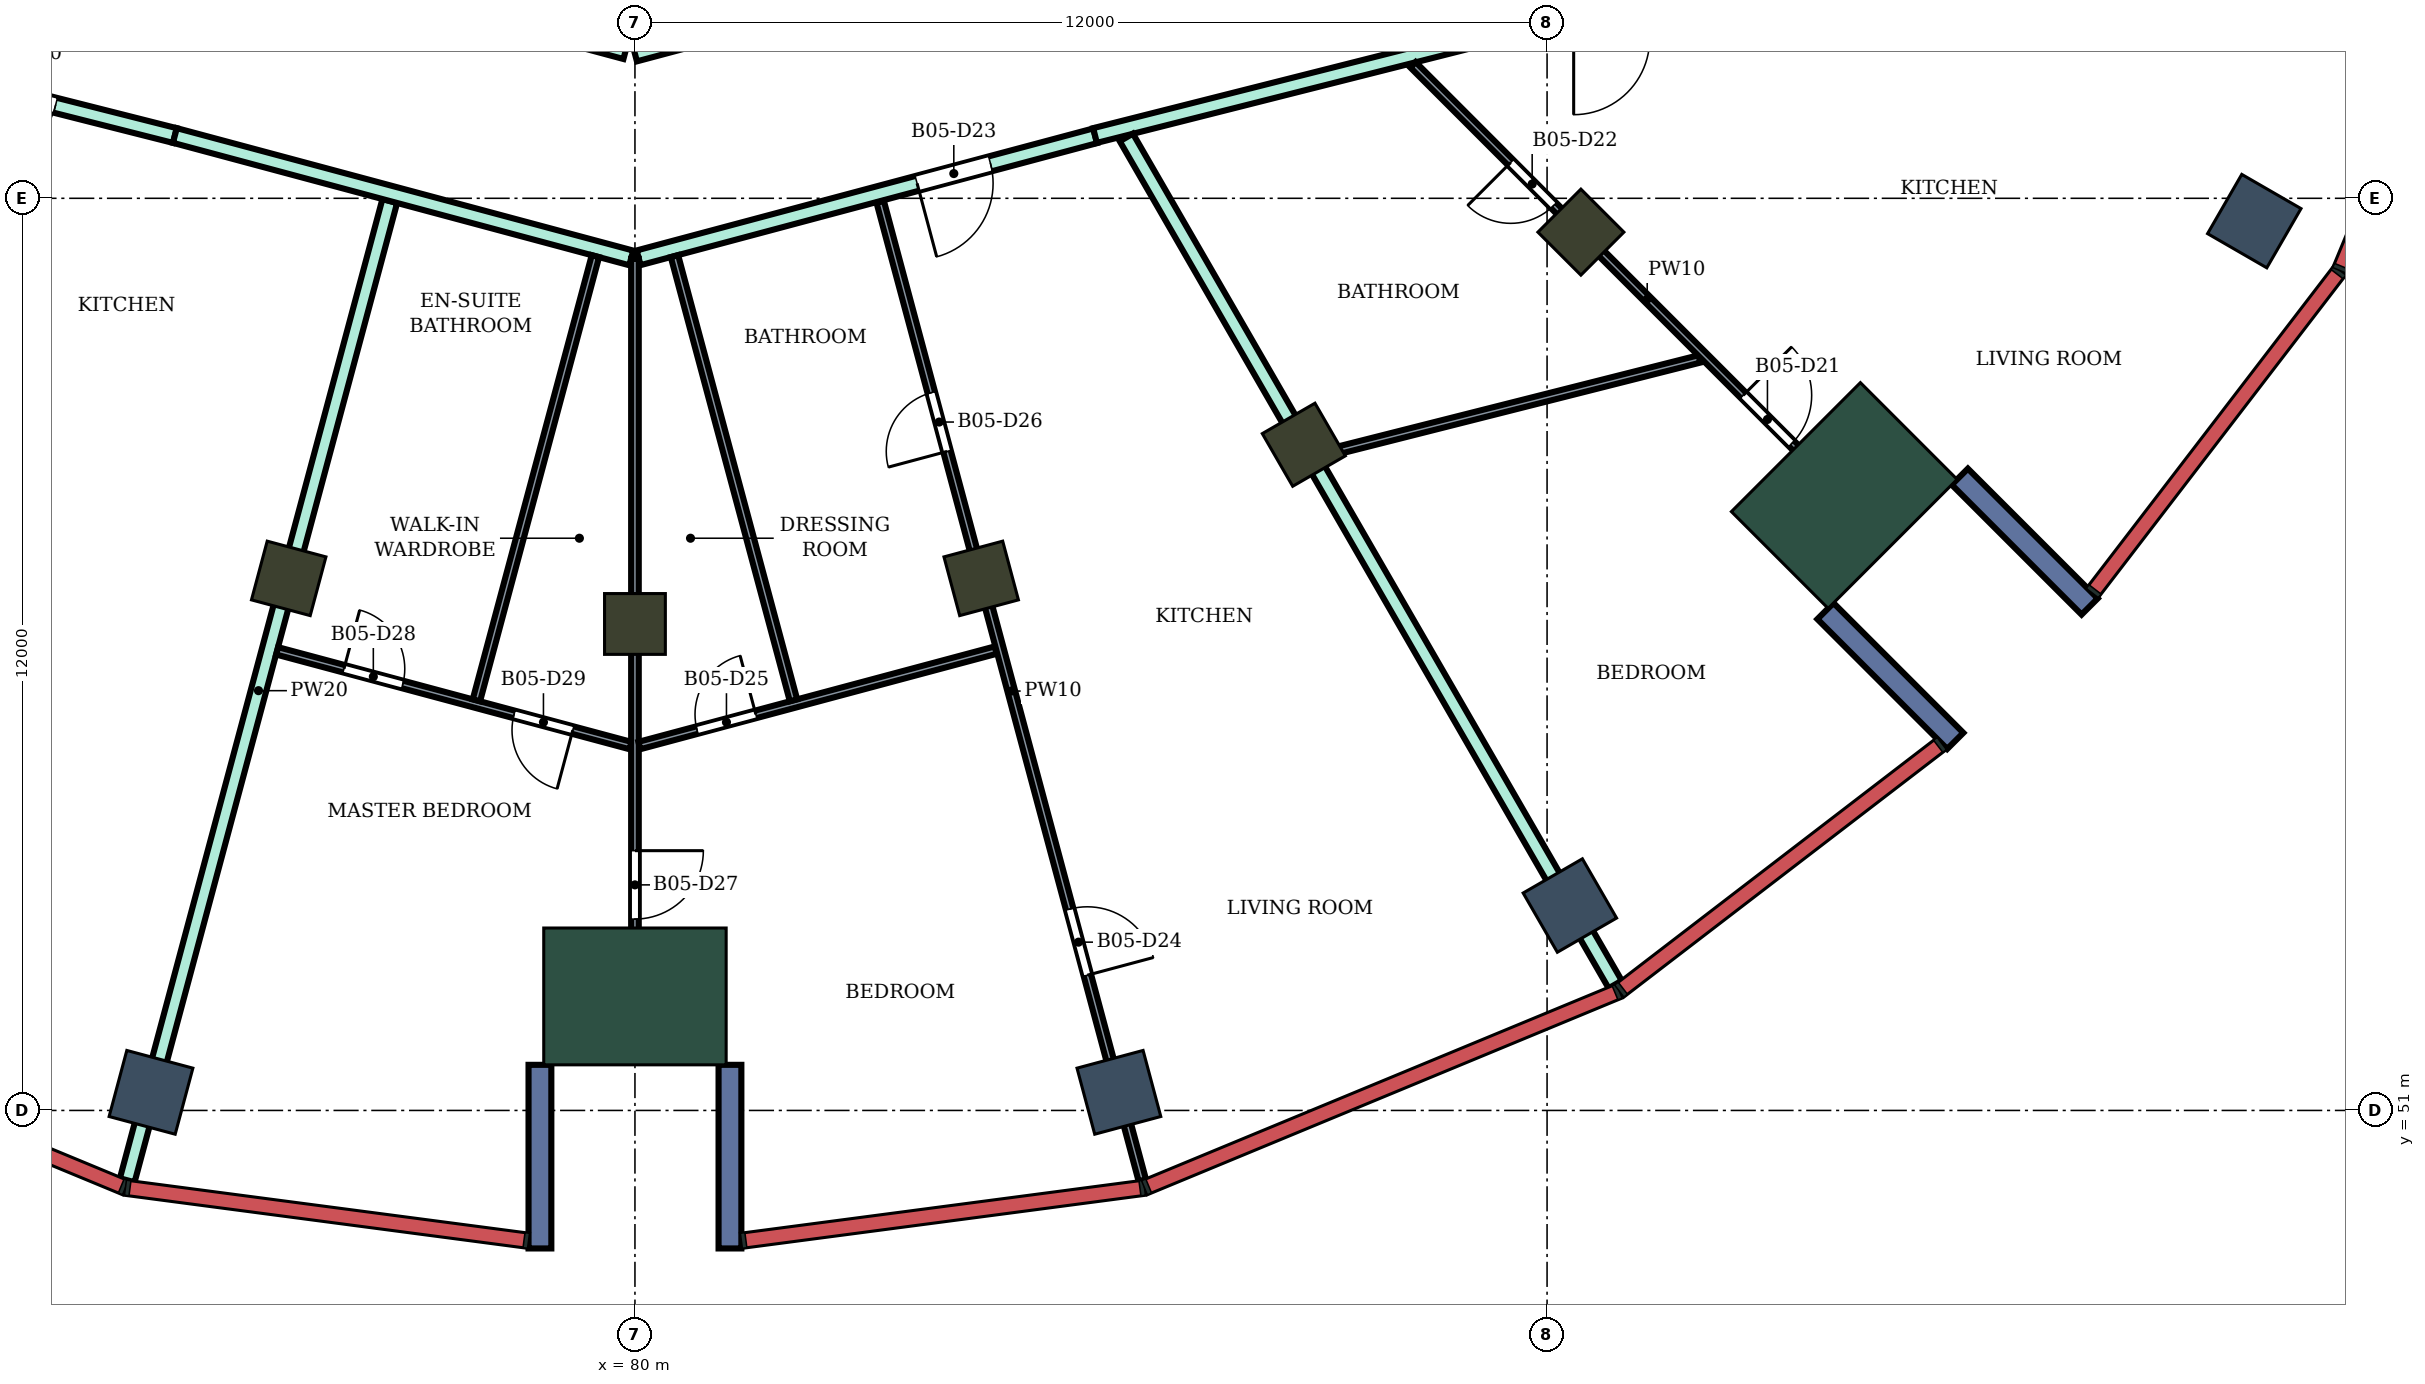
"""IFC4 building model, lengths in metres.
Left out: names, types, materials, properties, quantities, classifications, styles, units other than length and angle.
Written with IfcOpenShell. Run it as: python <this file> out.ifc"""

import sys

from ifc_helpers import new_model, si_unit, direction, frame, frame_2d, origin, origin_2d, place, context, subcontext, project, spatial, rectangle, extrude, element, fill, save


model = new_model("IFC4")
c1 = context("Model", 3, precision=1e-05, world=origin(), true_north=direction((0.0, 1.0)))
c2 = subcontext(c1, "Body", "Model", "MODEL_VIEW")
j1 = project(units=[si_unit("LENGTHUNIT", "METRE"), si_unit("PLANEANGLEUNIT", "RADIAN")], contexts=[c1])
p1 = place(None, origin())
s1 = spatial("IfcSite", under=j1, at=p1, CompositionType="ELEMENT")
p2 = place(p1, origin())
s2 = spatial("IfcBuilding", under=s1, at=p2, CompositionType="ELEMENT")
p3 = place(p2, frame((0.0, 0.0, 262.5)))
s3 = spatial("IfcBuildingStorey", under=s2, at=p3, CompositionType="ELEMENT", Elevation=262.5)
for number, where, z_axis, x_axis in (
    (1, (73.633, 51.238, 0.0), (0.0, 0.0, 1.0), (-0.259, -0.966, 0.0)),
    (2, (86.367, 51.238, 0.0), (0.0, 0.0, 1.0), (0.259, -0.966, 0.0)),
    (3, (92.3, 53.696, 0.0), (0.0, 0.0, 1.0), (0.5, -0.866, 0.0)),
    (4, (101.304, 62.7, 0.0), (0.0, 0.0, 1.0), (0.866, -0.5, 0.0)),
):
    element("IfcColumn", number, at=place(p3, frame(where, z_axis=z_axis, x_axis=x_axis)), inside=s3, PredefinedType="COLUMN", context=c2, shape_type="SweptSolid", body=[
        extrude(rectangle(XDim=0.9, YDim=0.9, at=origin_2d()), origin(), (0.0, 0.0, 1.0), 4.2),
    ])
for number, where, z_axis, x_axis in (
    (5, (75.445, 58.0, 0.0), (0.0, 0.0, 1.0), (-0.259, -0.966, 0.0)),
    (6, (80.0, 57.4, 0.0), (0.0, 0.0, 1.0), (0.0, -1.0, 0.0)),
    (7, (84.555, 58.0, 0.0), (0.0, 0.0, 1.0), (0.259, -0.966, 0.0)),
    (8, (88.8, 59.758, 0.0), (0.0, 0.0, 1.0), (0.5, -0.866, 0.0)),
    (9, (92.445, 62.555, 0.0), (0.0, 0.0, 1.0), (0.707, -0.707, 0.0)),
):
    element("IfcColumn", number, at=place(p3, frame(where, z_axis=z_axis, x_axis=x_axis)), inside=s3, PredefinedType="COLUMN", context=c2, shape_type="SweptSolid", body=[
        extrude(rectangle(XDim=0.8, YDim=0.8, at=origin_2d()), origin(), (0.0, 0.0, 1.0), 4.2),
    ])
for number, where, z_axis, x_axis in (
    (10, (80.0, 52.5, 0.0), (0.0, 0.0, 1.0), (0.0, -1.0, 0.0)),
    (11, (95.91, 59.09, 0.0), (0.0, 0.0, 1.0), (0.707, -0.707, 0.0)),
):
    element("IfcColumn", number, at=place(p3, frame(where, z_axis=z_axis, x_axis=x_axis)), inside=s3, PredefinedType="COLUMN", context=c2, shape_type="SweptSolid", body=[
        extrude(rectangle(XDim=1.8, YDim=2.4, at=origin_2d()), origin(), (0.0, 0.0, 1.0), 4.2),
    ])
for number, where, z_axis, x_axis in (
    (12, (78.75, 51.6, 0.0), (0.0, 0.0, 1.0), (0.0, -1.0, 0.0)),
    (13, (81.25, 51.6, 0.0), (0.0, 0.0, 1.0), (0.0, -1.0, 0.0)),
    (14, (95.662, 57.57, 0.0), (0.0, 0.0, 1.0), (0.707, -0.707, 0.0)),
    (15, (97.43, 59.338, 0.0), (0.0, 0.0, 1.0), (0.707, -0.707, 0.0)),
):
    element("IfcWall", number, at=place(p3, frame(where, z_axis=z_axis, x_axis=x_axis)), inside=s3, PredefinedType="NOTDEFINED", context=c2, shape_type="SweptSolid", body=[
        extrude(rectangle(XDim=2.416, YDim=0.3, at=frame_2d((1.208, 0.0))), origin(), (0.0, 0.0, 1.0), 4.2),
    ])
p4 = place(p3, frame((68.2, 65.28, 0.0), z_axis=(0.0, 0.0, 1.0), x_axis=(0.969428528216, -0.245373854926, 0.0)))
e16 = element("IfcWall", 16, at=p4, inside=s3, PredefinedType="PARTITIONING", context=c2, shape_type="SweptSolid", body=[
    extrude(rectangle(XDim=5.928, YDim=0.2, at=frame_2d((2.964, 0.0))), origin(), (0.0, 0.0, 1.0), 3.75),
])
p5 = place(p4, frame((3.309, 0.0, 0.0)))
e17 = element("IfcOpeningElement", 17, at=p5, cuts=e16, PredefinedType="OPENING", context=c2, shape_type="SweptSolid", body=[
    extrude(rectangle(XDim=1.0, YDim=2.1, at=frame_2d((0.5, 1.05))), frame((0.0, 0.11, 0.0), z_axis=(0.0, -1.0, 0.0), x_axis=(1.0, 0.0, 0.0)), (0.0, 0.0, 1.0), 0.22),
])
p6 = place(p3, frame((73.32, 50.082, 0.0), z_axis=(0.0, 0.0, 1.0), x_axis=(0.258966962665, 0.965886179758, 0.0)))
e18 = element("IfcWall", 18, at=p6, inside=s3, PredefinedType="PARTITIONING", context=c2, shape_type="SweptSolid", body=[
    extrude(rectangle(XDim=13.337, YDim=0.2, at=frame_2d((6.668, 0.0))), origin(), (0.0, 0.0, 1.0), 3.75),
])
p7 = place(p3, frame((73.947, 63.826, 0.0), z_axis=(0.0, 0.0, 1.0), x_axis=(0.965856500469, -0.259077634122, 0.0)))
e19 = element("IfcWall", 19, at=p7, inside=s3, PredefinedType="PARTITIONING", context=c2, shape_type="SweptSolid", body=[
    extrude(rectangle(XDim=6.217, YDim=0.2, at=frame_2d((3.108, 0.0))), origin(), (0.0, 0.0, 1.0), 3.75),
])
p8 = place(p3, frame((74.603, 66.342, 0.0), z_axis=(0.0, 0.0, 1.0), x_axis=(0.965920893652, -0.258837453254, 0.0)))
e20 = element("IfcWall", 20, at=p8, inside=s3, PredefinedType="PARTITIONING", context=c2, shape_type="SweptSolid", body=[
    extrude(rectangle(XDim=5.458, YDim=0.2, at=frame_2d((2.729, 0.0))), origin(), (0.0, 0.0, 1.0), 3.75),
])
p9 = place(p8, frame((2.512, 0.0, 0.0)))
e21 = element("IfcOpeningElement", 21, at=p9, cuts=e20, PredefinedType="OPENING", context=c2, shape_type="SweptSolid", body=[
    extrude(rectangle(XDim=0.9, YDim=2.1, at=frame_2d((0.45, 1.05))), frame((0.0, 0.11, 0.0), z_axis=(0.0, -1.0, 0.0), x_axis=(1.0, 0.0, 0.0)), (0.0, 0.0, 1.0), 0.22),
])
p10 = place(p3, frame((80.048, 62.217, 0.0), z_axis=(0.0, 0.0, 1.0), x_axis=(0.966097920642, 0.258175923996, 0.0)))
e22 = element("IfcWall", 22, at=p10, inside=s3, PredefinedType="PARTITIONING", context=c2, shape_type="SweptSolid", body=[
    extrude(rectangle(XDim=6.217, YDim=0.2, at=frame_2d((3.108, 0.0))), origin(), (0.0, 0.0, 1.0), 3.75),
])
p11 = place(p10, frame((3.792, 0.0, 0.0)))
e23 = element("IfcOpeningElement", 23, at=p11, cuts=e22, PredefinedType="OPENING", context=c2, shape_type="SweptSolid", body=[
    extrude(rectangle(XDim=1.0, YDim=2.1, at=frame_2d((0.5, 1.05))), frame((0.0, 0.11, 0.0), z_axis=(0.0, -1.0, 0.0), x_axis=(1.0, 0.0, 0.0)), (0.0, 0.0, 1.0), 0.22),
])
p12 = place(p3, frame((80.0, 64.898, 0.0), z_axis=(0.0, 0.0, 1.0), x_axis=(0.966236923997, 0.25765520896, 0.0)))
e24 = element("IfcWall", 24, at=p12, inside=s3, PredefinedType="PARTITIONING", context=c2, shape_type="SweptSolid", body=[
    extrude(rectangle(XDim=8.168, YDim=0.2, at=frame_2d((4.084, 0.0))), origin(), (0.0, 0.0, 1.0), 3.75),
])
p13 = place(p12, frame((1.893, 0.0, 0.0)))
e25 = element("IfcOpeningElement", 25, at=p13, cuts=e24, PredefinedType="OPENING", context=c2, shape_type="SweptSolid", body=[
    extrude(rectangle(XDim=1.8, YDim=2.1, at=frame_2d((0.9, 1.05))), frame((0.0, 0.11, 0.0), z_axis=(0.0, -1.0, 0.0), x_axis=(1.0, 0.0, 0.0)), (0.0, 0.0, 1.0), 0.22),
])
p14 = place(p3, frame((86.053, 63.826, 0.0), z_axis=(0.0, 0.0, 1.0), x_axis=(0.969490004987, 0.245130843083, 0.0)))
e26 = element("IfcWall", 26, at=p14, inside=s3, PredefinedType="PARTITIONING", context=c2, shape_type="SweptSolid", body=[
    extrude(rectangle(XDim=5.908, YDim=0.2, at=frame_2d((2.954, 0.0))), origin(), (0.0, 0.0, 1.0), 3.75),
])
p15 = place(p3, frame((86.465, 63.801, 0.0), z_axis=(0.0, 0.0, 1.0), x_axis=(0.499914633865, -0.866074684336, 0.0)))
e27 = element("IfcWall", 27, at=p15, inside=s3, PredefinedType="PARTITIONING", context=c2, shape_type="SweptSolid", body=[
    extrude(rectangle(XDim=12.866, YDim=0.2, at=frame_2d((6.433, 0.0))), origin(), (0.0, 0.0, 1.0), 3.75),
])
p16 = place(p3, frame((75.293, 57.046, 0.0), z_axis=(0.0, 0.0, 1.0), x_axis=(0.965904119246, -0.258900043306, 0.0)))
e28 = element("IfcWall", 28, at=p16, inside=s3, PredefinedType="PARTITIONING", context=c2, shape_type="SweptSolid", body=[
    extrude(rectangle(XDim=4.813, YDim=0.1, at=frame_2d((2.406, 0.0))), origin(), (0.0, 0.0, 1.0), 3.75),
])
p17 = place(p16, frame((0.91, 0.0, 0.0)))
e29 = element("IfcOpeningElement", 29, at=p17, cuts=e28, PredefinedType="OPENING", context=c2, shape_type="SweptSolid", body=[
    extrude(rectangle(XDim=0.8, YDim=2.1, at=frame_2d((0.4, 1.05))), frame((0.0, 0.06, 0.0), z_axis=(0.0, -1.0, 0.0), x_axis=(1.0, 0.0, 0.0)), (0.0, 0.0, 1.0), 0.12),
])
p18 = place(p16, frame((3.227, 0.0, 0.0)))
e30 = element("IfcOpeningElement", 30, at=p18, cuts=e28, PredefinedType="OPENING", context=c2, shape_type="SweptSolid", body=[
    extrude(rectangle(XDim=0.8, YDim=2.1, at=frame_2d((0.4, 1.05))), frame((0.0, 0.06, 0.0), z_axis=(0.0, -1.0, 0.0), x_axis=(1.0, 0.0, 0.0)), (0.0, 0.0, 1.0), 0.12),
])
p19 = place(p3, frame((77.914, 56.396, 0.0), z_axis=(0.0, 0.0, 1.0), x_axis=(0.258822816874, 0.965924815638, 0.0)))
e31 = element("IfcWall", 31, at=p19, inside=s3, PredefinedType="PARTITIONING", context=c2, shape_type="SweptSolid", body=[
    extrude(rectangle(XDim=6.05, YDim=0.1, at=frame_2d((3.025, 0.0))), origin(), (0.0, 0.0, 1.0), 3.75),
])
p20 = place(p3, frame((80.0, 51.8, 0.0), z_axis=(0.0, 0.0, 1.0), x_axis=(0.0, 1.0, 0.0)))
e32 = element("IfcWall", 32, at=p20, inside=s3, PredefinedType="PARTITIONING", context=c2, shape_type="SweptSolid", body=[
    extrude(rectangle(XDim=10.404, YDim=0.1, at=frame_2d((5.202, 0.0))), origin(), (0.0, 0.0, 1.0), 3.75),
])
p21 = place(p20, frame((1.718, 0.0, 0.0)))
e33 = element("IfcOpeningElement", 33, at=p21, cuts=e32, PredefinedType="OPENING", context=c2, shape_type="SweptSolid", body=[
    extrude(rectangle(XDim=0.9, YDim=2.1, at=frame_2d((0.45, 1.05))), frame((0.0, 0.06, 0.0), z_axis=(0.0, -1.0, 0.0), x_axis=(1.0, 0.0, 0.0)), (0.0, 0.0, 1.0), 0.12),
])
p22 = place(p3, frame((80.058, 55.801, 0.0), z_axis=(0.0, 0.0, 1.0), x_axis=(0.965968926881, 0.258658137896, 0.0)))
e34 = element("IfcWall", 34, at=p22, inside=s3, PredefinedType="PARTITIONING", context=c2, shape_type="SweptSolid", body=[
    extrude(rectangle(XDim=4.854, YDim=0.1, at=frame_2d((2.427, 0.0))), origin(), (0.0, 0.0, 1.0), 3.75),
])
p23 = place(p22, frame((0.786, 0.0, 0.0)))
e35 = element("IfcOpeningElement", 35, at=p23, cuts=e34, PredefinedType="OPENING", context=c2, shape_type="SweptSolid", body=[
    extrude(rectangle(XDim=0.8, YDim=2.1, at=frame_2d((0.4, 1.05))), frame((0.0, 0.06, 0.0), z_axis=(0.0, -1.0, 0.0), x_axis=(1.0, 0.0, 0.0)), (0.0, 0.0, 1.0), 0.12),
])
p24 = place(p3, frame((80.52, 62.24, 0.0), z_axis=(0.0, 0.0, 1.0), x_axis=(0.258822816874, -0.965924815638, 0.0)))
e36 = element("IfcWall", 36, at=p24, inside=s3, PredefinedType="PARTITIONING", context=c2, shape_type="SweptSolid", body=[
    extrude(rectangle(XDim=6.05, YDim=0.1, at=frame_2d((3.025, 0.0))), origin(), (0.0, 0.0, 1.0), 3.75),
])
p25 = place(p3, frame((83.226, 62.954, 0.0), z_axis=(0.0, 0.0, 1.0), x_axis=(0.258737611245, -0.965947642746, 0.0)))
e37 = element("IfcWall", 37, at=p25, inside=s3, PredefinedType="PARTITIONING", context=c2, shape_type="SweptSolid", body=[
    extrude(rectangle(XDim=13.328, YDim=0.1, at=frame_2d((6.664, 0.0))), origin(), (0.0, 0.0, 1.0), 3.75),
])
p26 = place(p25, frame((9.634, 0.0, 0.0)))
e38 = element("IfcOpeningElement", 38, at=p26, cuts=e37, PredefinedType="OPENING", context=c2, shape_type="SweptSolid", body=[
    extrude(rectangle(XDim=0.9, YDim=2.1, at=frame_2d((0.45, 1.05))), frame((0.0, 0.06, 0.0), z_axis=(0.0, -1.0, 0.0), x_axis=(1.0, 0.0, 0.0)), (0.0, 0.0, 1.0), 0.12),
])
p27 = place(p25, frame((2.6, 0.0, 0.0)))
e39 = element("IfcOpeningElement", 39, at=p27, cuts=e37, PredefinedType="OPENING", context=c2, shape_type="SweptSolid", body=[
    extrude(rectangle(XDim=0.8, YDim=2.1, at=frame_2d((0.4, 1.05))), frame((0.0, 0.06, 0.0), z_axis=(0.0, -1.0, 0.0), x_axis=(1.0, 0.0, 0.0)), (0.0, 0.0, 1.0), 0.12),
])
p28 = place(p3, frame((89.002, 59.621, 0.0), z_axis=(0.0, 0.0, 1.0), x_axis=(0.969445576262, 0.245306491285, 0.0)))
e40 = element("IfcWall", 40, at=p28, inside=s3, PredefinedType="PARTITIONING", context=c2, shape_type="SweptSolid", body=[
    extrude(rectangle(XDim=5.16, YDim=0.1, at=frame_2d((2.58, 0.0))), origin(), (0.0, 0.0, 1.0), 3.75),
])
p29 = place(p3, frame((90.235, 64.757, 0.0), z_axis=(0.0, 0.0, 1.0), x_axis=(0.706924769926, -0.707288745609, 0.0)))
e41 = element("IfcWall", 41, at=p29, inside=s3, PredefinedType="PARTITIONING", context=c2, shape_type="SweptSolid", body=[
    extrude(rectangle(XDim=8.72, YDim=0.1, at=frame_2d((4.36, 0.0))), origin(), (0.0, 0.0, 1.0), 3.75),
])
p30 = place(p29, frame((6.148, 0.0, 0.0)))
e42 = element("IfcOpeningElement", 42, at=p30, cuts=e41, PredefinedType="OPENING", context=c2, shape_type="SweptSolid", body=[
    extrude(rectangle(XDim=0.9, YDim=2.1, at=frame_2d((0.45, 1.05))), frame((0.0, 0.06, 0.0), z_axis=(0.0, -1.0, 0.0), x_axis=(1.0, 0.0, 0.0)), (0.0, 0.0, 1.0), 0.12),
])
p31 = place(p29, frame((1.819, 0.0, 0.0)))
e43 = element("IfcOpeningElement", 43, at=p31, cuts=e41, PredefinedType="OPENING", context=c2, shape_type="SweptSolid", body=[
    extrude(rectangle(XDim=0.8, YDim=2.1, at=frame_2d((0.4, 1.05))), frame((0.0, 0.06, 0.0), z_axis=(0.0, -1.0, 0.0), x_axis=(1.0, 0.0, 0.0)), (0.0, 0.0, 1.0), 0.12),
])
p32 = place(p30, origin())
e44 = element("IfcDoor", 44, at=p32, inside=s3, OperationType="SINGLE_SWING_LEFT", PredefinedType="DOOR", context=c2, shape_type="SweptSolid", body=[
    extrude(rectangle(XDim=0.9, YDim=2.1, at=frame_2d((0.45, 1.05))), frame((0.0, 0.025, 0.0), z_axis=(0.0, -1.0, 0.0), x_axis=(1.0, 0.0, 0.0)), (0.0, 0.0, 1.0), 0.05),
])
fill(e42, e44)
p33 = place(p31, frame((0.8, 0.0, 0.0), z_axis=(0.0, 0.0, 1.0), x_axis=(-1.0, 0.0, 0.0)))
e45 = element("IfcDoor", 45, at=p33, inside=s3, OperationType="SINGLE_SWING_RIGHT", PredefinedType="DOOR", context=c2, shape_type="SweptSolid", body=[
    extrude(rectangle(XDim=0.8, YDim=2.1, at=frame_2d((0.4, 1.05))), frame((0.0, 0.025, 0.0), z_axis=(0.0, -1.0, 0.0), x_axis=(1.0, 0.0, 0.0)), (0.0, 0.0, 1.0), 0.05),
])
fill(e43, e45)
p34 = place(p11, frame((1.0, 0.0, 0.0), z_axis=(0.0, 0.0, 1.0), x_axis=(-1.0, 0.0, 0.0)))
e46 = element("IfcDoor", 46, at=p34, inside=s3, OperationType="SINGLE_SWING_RIGHT", PredefinedType="DOOR", context=c2, shape_type="SweptSolid", body=[
    extrude(rectangle(XDim=1.0, YDim=2.1, at=frame_2d((0.5, 1.05))), frame((0.0, 0.025, 0.0), z_axis=(0.0, -1.0, 0.0), x_axis=(1.0, 0.0, 0.0)), (0.0, 0.0, 1.0), 0.05),
])
fill(e23, e46)
p35 = place(p26, origin())
e47 = element("IfcDoor", 47, at=p35, inside=s3, OperationType="SINGLE_SWING_RIGHT", PredefinedType="DOOR", context=c2, shape_type="SweptSolid", body=[
    extrude(rectangle(XDim=0.9, YDim=2.1, at=frame_2d((0.45, 1.05))), frame((0.0, 0.025, 0.0), z_axis=(0.0, -1.0, 0.0), x_axis=(1.0, 0.0, 0.0)), (0.0, 0.0, 1.0), 0.05),
])
fill(e38, e47)
p36 = place(p23, origin())
e48 = element("IfcDoor", 48, at=p36, inside=s3, OperationType="SINGLE_SWING_RIGHT", PredefinedType="DOOR", context=c2, shape_type="SweptSolid", body=[
    extrude(rectangle(XDim=0.8, YDim=2.1, at=frame_2d((0.4, 1.05))), frame((0.0, 0.025, 0.0), z_axis=(0.0, -1.0, 0.0), x_axis=(1.0, 0.0, 0.0)), (0.0, 0.0, 1.0), 0.05),
])
fill(e35, e48)
p37 = place(p27, frame((0.8, 0.0, 0.0), z_axis=(0.0, 0.0, 1.0), x_axis=(-1.0, 0.0, 0.0)))
e49 = element("IfcDoor", 49, at=p37, inside=s3, OperationType="SINGLE_SWING_LEFT", PredefinedType="DOOR", context=c2, shape_type="SweptSolid", body=[
    extrude(rectangle(XDim=0.8, YDim=2.1, at=frame_2d((0.4, 1.05))), frame((0.0, 0.025, 0.0), z_axis=(0.0, -1.0, 0.0), x_axis=(1.0, 0.0, 0.0)), (0.0, 0.0, 1.0), 0.05),
])
fill(e39, e49)
p38 = place(p21, frame((0.9, 0.0, 0.0), z_axis=(0.0, 0.0, 1.0), x_axis=(-1.0, 0.0, 0.0)))
e50 = element("IfcDoor", 50, at=p38, inside=s3, OperationType="SINGLE_SWING_LEFT", PredefinedType="DOOR", context=c2, shape_type="SweptSolid", body=[
    extrude(rectangle(XDim=0.9, YDim=2.1, at=frame_2d((0.45, 1.05))), frame((0.0, 0.025, 0.0), z_axis=(0.0, -1.0, 0.0), x_axis=(1.0, 0.0, 0.0)), (0.0, 0.0, 1.0), 0.05),
])
fill(e33, e50)
p39 = place(p17, origin())
e51 = element("IfcDoor", 51, at=p39, inside=s3, OperationType="SINGLE_SWING_LEFT", PredefinedType="DOOR", context=c2, shape_type="SweptSolid", body=[
    extrude(rectangle(XDim=0.8, YDim=2.1, at=frame_2d((0.4, 1.05))), frame((0.0, 0.025, 0.0), z_axis=(0.0, -1.0, 0.0), x_axis=(1.0, 0.0, 0.0)), (0.0, 0.0, 1.0), 0.05),
])
fill(e29, e51)
p40 = place(p18, frame((0.8, 0.0, 0.0), z_axis=(0.0, 0.0, 1.0), x_axis=(-1.0, 0.0, 0.0)))
e52 = element("IfcDoor", 52, at=p40, inside=s3, OperationType="SINGLE_SWING_LEFT", PredefinedType="DOOR", context=c2, shape_type="SweptSolid", body=[
    extrude(rectangle(XDim=0.8, YDim=2.1, at=frame_2d((0.4, 1.05))), frame((0.0, 0.025, 0.0), z_axis=(0.0, -1.0, 0.0), x_axis=(1.0, 0.0, 0.0)), (0.0, 0.0, 1.0), 0.05),
])
fill(e30, e52)
p41 = place(p5, frame((1.0, 0.0, 0.0), z_axis=(0.0, 0.0, 1.0), x_axis=(-1.0, 0.0, 0.0)))
e53 = element("IfcDoor", 53, at=p41, inside=s3, OperationType="SINGLE_SWING_RIGHT", PredefinedType="DOOR", context=c2, shape_type="SweptSolid", body=[
    extrude(rectangle(XDim=1.0, YDim=2.1, at=frame_2d((0.5, 1.05))), frame((0.0, 0.025, 0.0), z_axis=(0.0, -1.0, 0.0), x_axis=(1.0, 0.0, 0.0)), (0.0, 0.0, 1.0), 0.05),
])
fill(e17, e53)
save(model, sys.argv[1])
